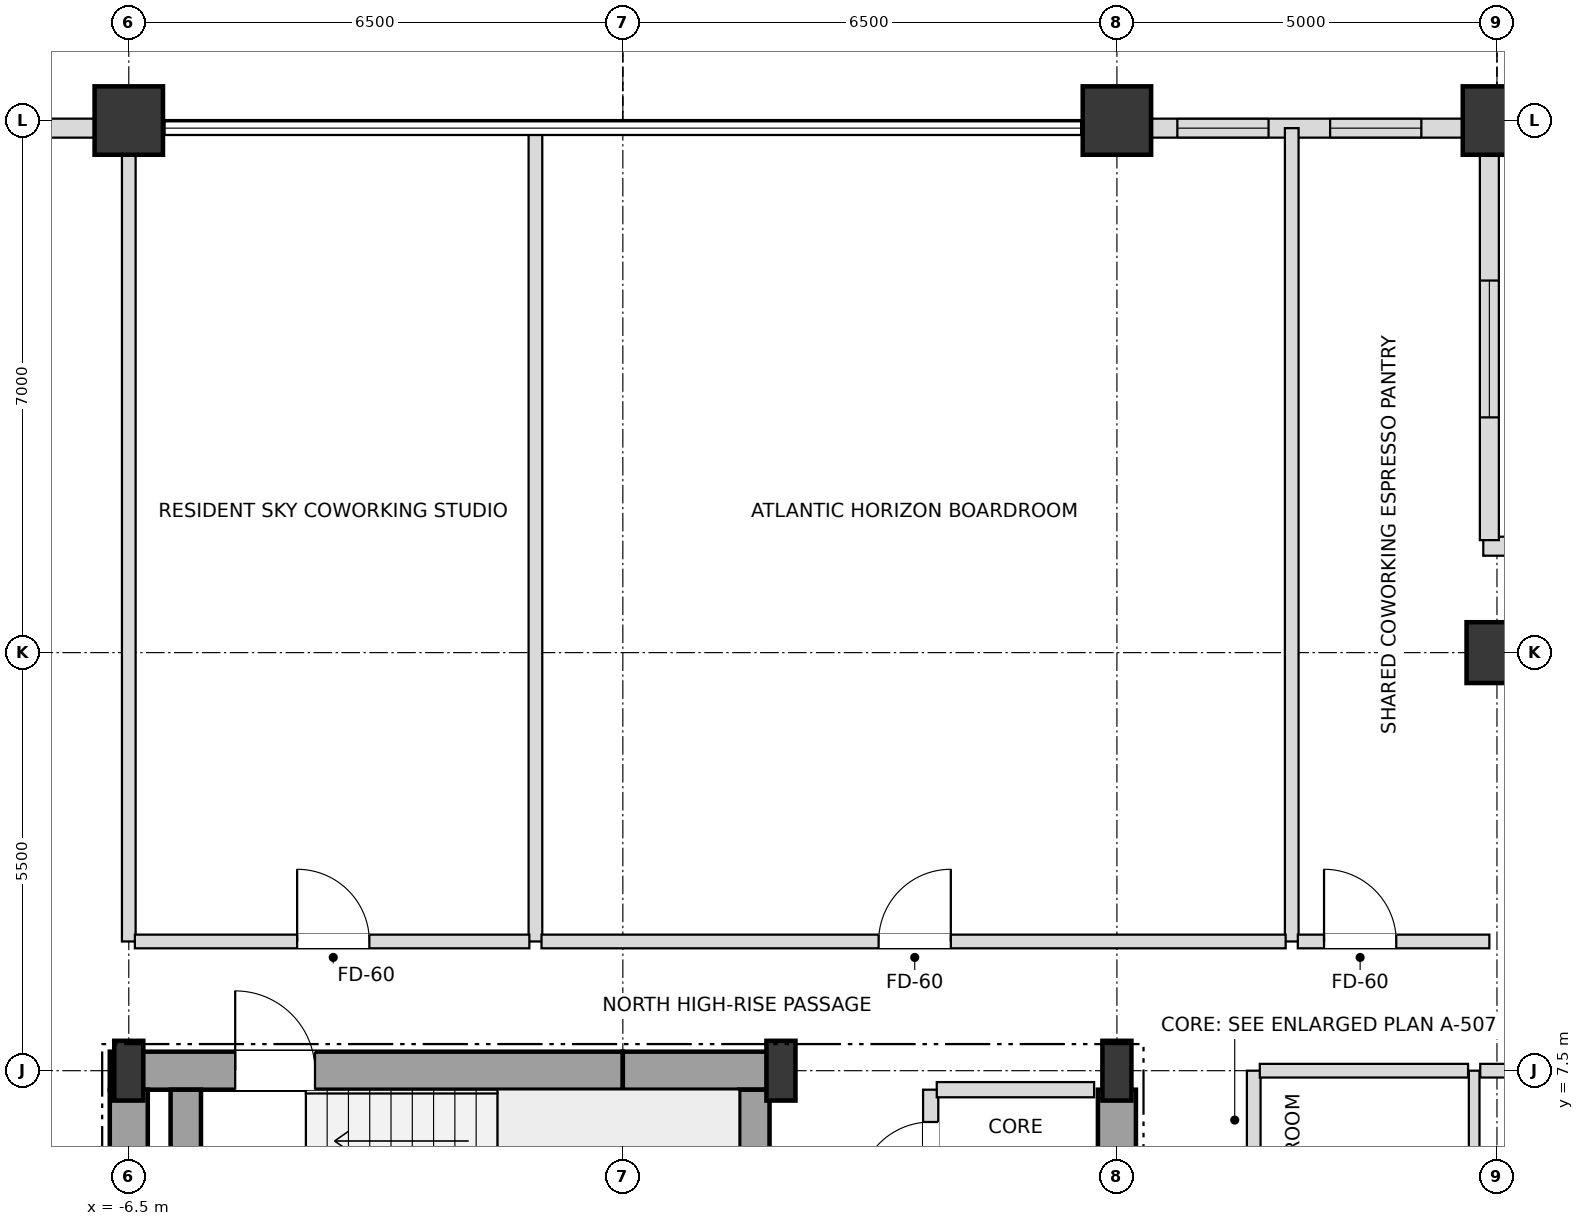
"""IFC4 building model, lengths in metres.
Left out: names, types, materials, properties, quantities, classifications, styles, units other than length and angle.
Written with IfcOpenShell. Run it as: python <this file> out.ifc"""

import sys

from ifc_helpers import new_model, si_unit, direction, frame, frame_2d, origin, origin_2d, place, context, subcontext, project, spatial, rectangle, i_section, extrude, element, fill, save


model = new_model("IFC4")
c1 = context("Model", 3, precision=1e-05, world=origin(), true_north=direction((0.0, 1.0)))
c2 = subcontext(c1, "Body", "Model", "MODEL_VIEW")
j1 = project(units=[si_unit("LENGTHUNIT", "METRE"), si_unit("PLANEANGLEUNIT", "RADIAN")], contexts=[c1])
p1 = place(None, origin())
s1 = spatial("IfcSite", under=j1, at=p1, CompositionType="ELEMENT")
p2 = place(p1, origin())
s2 = spatial("IfcBuilding", under=s1, at=p2, CompositionType="ELEMENT")
p3 = place(p2, frame((0.0, 0.0, 294.3)))
s3 = spatial("IfcBuildingStorey", under=s2, at=p3, CompositionType="ELEMENT", Elevation=294.3)
for number, where, z_axis, x_axis in (
    (1, (-6.5, 7.5, 0.0), (0.0, 0.0, 1.0), (1.0, 0.0, 0.0)),
    (2, (2.08, 7.5, 0.0), (0.0, 0.0, 1.0), (1.0, 0.0, 0.0)),
    (3, (6.5, 7.5, 0.0), (0.0, 0.0, 1.0), (1.0, 0.0, 0.0)),
):
    element("IfcColumn", number, at=place(p3, frame(where, z_axis=z_axis, x_axis=x_axis)), inside=s3, PredefinedType="COLUMN", context=c2, shape_type="SweptSolid", body=[
        extrude(i_section(OverallWidth=0.382, OverallDepth=0.786, WebThickness=0.02, FlangeThickness=0.033, at=origin_2d()), origin(), (0.0, 0.0, 1.0), 3.6),
    ])
for number, where, z_axis, x_axis in (
    (4, (11.5, 20.0, 0.0), (0.0, 0.0, 1.0), (1.0, 0.0, 0.0)),
    (5, (6.5, 20.0, 0.0), (0.0, 0.0, 1.0), (1.0, 0.0, 0.0)),
    (6, (-6.5, 20.0, 0.0), (0.0, 0.0, 1.0), (1.0, 0.0, 0.0)),
):
    element("IfcColumn", number, at=place(p3, frame(where, z_axis=z_axis, x_axis=x_axis)), inside=s3, PredefinedType="USERDEFINED", context=c2, shape_type="SweptSolid", body=[
        extrude(rectangle(XDim=0.9, YDim=0.9, at=origin_2d()), origin(), (0.0, 0.0, 1.0), 3.6),
    ])
p4 = place(p3, frame((11.5, 13.0, 0.0), z_axis=(0.0, 0.0, 1.0), x_axis=(1.0, 0.0, 0.0)))
e7 = element("IfcColumn", 7, at=p4, inside=s3, PredefinedType="COLUMN", context=c2, shape_type="SweptSolid", body=[
    extrude(rectangle(XDim=0.8, YDim=0.8, at=origin_2d()), origin(), (0.0, 0.0, 1.0), 3.6),
])
p5 = place(p3, frame((11.055, 19.9, 0.0), z_axis=(0.0, 0.0, 1.0), x_axis=(-1.0, 0.0, 0.0)))
e8 = element("IfcWall", 8, at=p5, inside=s3, PredefinedType="SOLIDWALL", context=c2, shape_type="SweptSolid", body=[
    extrude(rectangle(XDim=4.11, YDim=0.25, at=frame_2d((2.055, 0.0))), origin(), (0.0, 0.0, 1.0), 2.748),
])
p6 = place(p5, frame((0.55, 0.0, 0.72)))
e9 = element("IfcOpeningElement", 9, at=p6, cuts=e8, PredefinedType="OPENING", context=c2, shape_type="SweptSolid", body=[
    extrude(rectangle(XDim=1.2, YDim=1.68, at=frame_2d((0.6, 0.84))), frame((0.0, 0.135, 0.0), z_axis=(0.0, -1.0, 0.0), x_axis=(1.0, 0.0, 0.0)), (0.0, 0.0, 1.0), 0.27),
])
p7 = place(p5, frame((2.56, 0.0, 0.72)))
e10 = element("IfcOpeningElement", 10, at=p7, cuts=e8, PredefinedType="OPENING", context=c2, shape_type="SweptSolid", body=[
    extrude(rectangle(XDim=1.2, YDim=1.68, at=frame_2d((0.6, 0.84))), frame((0.0, 0.135, 0.0), z_axis=(0.0, -1.0, 0.0), x_axis=(1.0, 0.0, 0.0)), (0.0, 0.0, 1.0), 0.27),
])
p8 = place(p3, frame((-6.945, 19.9, 0.0), z_axis=(0.0, 0.0, 1.0), x_axis=(-1.0, 0.0, 0.0)))
e11 = element("IfcWall", 11, at=p8, inside=s3, PredefinedType="SOLIDWALL", context=c2, shape_type="SweptSolid", body=[
    extrude(rectangle(XDim=4.11, YDim=0.25, at=frame_2d((2.055, 0.0))), origin(), (0.0, 0.0, 1.0), 2.748),
])
p9 = place(p8, frame((1.155, 0.0, 0.72)))
e12 = element("IfcOpeningElement", 12, at=p9, cuts=e11, PredefinedType="OPENING", context=c2, shape_type="SweptSolid", body=[
    extrude(rectangle(XDim=1.8, YDim=1.68, at=frame_2d((0.9, 0.84))), frame((0.0, 0.135, 0.0), z_axis=(0.0, -1.0, 0.0), x_axis=(1.0, 0.0, 0.0)), (0.0, 0.0, 1.0), 0.27),
])
p10 = place(p3, frame((16.98, 14.4, 0.0), z_axis=(0.0, 0.0, 1.0), x_axis=(-1.0, 0.0, 0.0)))
e13 = element("IfcWall", 13, at=p10, inside=s3, PredefinedType="SOLIDWALL", context=c2, shape_type="SweptSolid", body=[
    extrude(rectangle(XDim=5.66, YDim=0.25, at=frame_2d((2.83, 0.0))), origin(), (0.0, 0.0, 1.0), 2.748),
])
p11 = place(p10, frame((0.595, 0.0, 0.72)))
e14 = element("IfcOpeningElement", 14, at=p11, cuts=e13, PredefinedType="OPENING", context=c2, shape_type="SweptSolid", body=[
    extrude(rectangle(XDim=1.8, YDim=1.68, at=frame_2d((0.9, 0.84))), frame((0.0, 0.135, 0.0), z_axis=(0.0, -1.0, 0.0), x_axis=(1.0, 0.0, 0.0)), (0.0, 0.0, 1.0), 0.27),
])
p12 = place(p10, frame((3.265, 0.0, 0.72)))
e15 = element("IfcOpeningElement", 15, at=p12, cuts=e13, PredefinedType="OPENING", context=c2, shape_type="SweptSolid", body=[
    extrude(rectangle(XDim=1.8, YDim=1.68, at=frame_2d((0.9, 0.84))), frame((0.0, 0.135, 0.0), z_axis=(0.0, -1.0, 0.0), x_axis=(1.0, 0.0, 0.0)), (0.0, 0.0, 1.0), 0.27),
])
p13 = place(p3, frame((11.4, 14.48, 0.0), z_axis=(0.0, 0.0, 1.0), x_axis=(0.0, 1.0, 0.0)))
e16 = element("IfcWall", 16, at=p13, inside=s3, PredefinedType="SOLIDWALL", context=c2, shape_type="SweptSolid", body=[
    extrude(rectangle(XDim=5.34, YDim=0.25, at=frame_2d((2.67, 0.0))), origin(), (0.0, 0.0, 1.0), 2.748),
])
p14 = place(p13, frame((1.615, 0.0, 0.72)))
e17 = element("IfcOpeningElement", 17, at=p14, cuts=e16, PredefinedType="OPENING", context=c2, shape_type="SweptSolid", body=[
    extrude(rectangle(XDim=1.8, YDim=1.68, at=frame_2d((0.9, 0.84))), frame((0.0, 0.135, 0.0), z_axis=(0.0, -1.0, 0.0), x_axis=(1.0, 0.0, 0.0)), (0.0, 0.0, 1.0), 0.27),
])
p15 = place(p3, frame((-6.75, 7.5, 0.0), z_axis=(0.0, 0.0, 1.0), x_axis=(1.0, 0.0, 0.0)))
e18 = element("IfcWall", 18, at=p15, inside=s3, PredefinedType="SHEAR", context=c2, shape_type="SweptSolid", body=[
    extrude(rectangle(XDim=6.75, YDim=0.5, at=frame_2d((3.375, 0.0))), origin(), (0.0, 0.0, 1.0), 3.38),
])
p16 = place(p15, frame((1.65, 0.0, 0.0)))
e19 = element("IfcOpeningElement", 19, at=p16, cuts=e18, PredefinedType="OPENING", context=c2, shape_type="SweptSolid", body=[
    extrude(rectangle(XDim=1.05, YDim=2.15, at=frame_2d((0.525, 1.075))), frame((0.0, 0.26, 0.0), z_axis=(0.0, -1.0, 0.0), x_axis=(1.0, 0.0, 0.0)), (0.0, 0.0, 1.0), 0.52),
])
p17 = place(p3, frame((0.0, 7.5, 0.0), z_axis=(0.0, 0.0, 1.0), x_axis=(1.0, 0.0, 0.0)))
e20 = element("IfcWall", 20, at=p17, inside=s3, PredefinedType="SHEAR", context=c2, shape_type="SweptSolid", body=[
    extrude(rectangle(XDim=2.08, YDim=0.5, at=frame_2d((1.04, 0.0))), origin(), (0.0, 0.0, 1.0), 3.38),
])
for number, where, z_axis, x_axis in (
    (21, (-6.5, 3.95, 0.0), (0.0, 0.0, 1.0), (0.0, 1.0, 0.0)),
    (22, (6.5, 3.95, 0.0), (0.0, 0.0, 1.0), (0.0, 1.0, 0.0)),
):
    element("IfcWall", number, at=place(p3, frame(where, z_axis=z_axis, x_axis=x_axis)), inside=s3, PredefinedType="SHEAR", context=c2, shape_type="SweptSolid", body=[
        extrude(rectangle(XDim=3.3, YDim=0.5, at=frame_2d((1.65, 0.0))), origin(), (0.0, 0.0, 1.0), 3.38),
    ])
for number, where, z_axis, x_axis in (
    (23, (1.73, 3.95, 0.0), (0.0, 0.0, 1.0), (0.0, 1.0, 0.0)),
    (24, (-5.75, 3.95, 0.0), (0.0, 0.0, 1.0), (0.0, 1.0, 0.0)),
):
    element("IfcWall", number, at=place(p3, frame(where, z_axis=z_axis, x_axis=x_axis)), inside=s3, PredefinedType="SHEAR", context=c2, shape_type="SweptSolid", body=[
        extrude(rectangle(XDim=3.3, YDim=0.4, at=frame_2d((1.65, 0.0))), origin(), (0.0, 0.0, 1.0), 3.38),
    ])
p18 = place(p3, frame((-6.5, 9.2, 0.0), z_axis=(0.0, 0.0, 1.0), x_axis=(0.0, 1.0, 0.0)))
e25 = element("IfcWall", 25, at=p18, inside=s3, PredefinedType="PARTITIONING", context=c2, shape_type="SweptSolid", body=[
    extrude(rectangle(XDim=10.7, YDim=0.18, at=frame_2d((5.35, 0.0))), origin(), (0.0, 0.0, 1.0), 2.826),
])
p19 = place(p3, frame((-1.15, 9.2, 0.0), z_axis=(0.0, 0.0, 1.0), x_axis=(0.0, 1.0, 0.0)))
e26 = element("IfcWall", 26, at=p19, inside=s3, PredefinedType="PARTITIONING", context=c2, shape_type="SweptSolid", body=[
    extrude(rectangle(XDim=10.7, YDim=0.18, at=frame_2d((5.35, 0.0))), origin(), (0.0, 0.0, 1.0), 3.018),
])
p20 = place(p3, frame((4.05, 5.55, 0.0), z_axis=(0.0, 0.0, 1.0), x_axis=(0.0, 1.0, 0.0)))
e27 = element("IfcWall", 27, at=p20, inside=s3, PredefinedType="SOLIDWALL", context=c2, shape_type="SweptSolid", body=[
    extrude(rectangle(XDim=1.7, YDim=0.2, at=frame_2d((0.85, 0.0))), origin(), (0.0, 0.0, 1.0), 3.38),
])
p21 = place(p20, frame((0.325, 0.0, 0.0)))
e28 = element("IfcOpeningElement", 28, at=p21, cuts=e27, PredefinedType="OPENING", context=c2, shape_type="SweptSolid", body=[
    extrude(rectangle(XDim=0.95, YDim=2.15, at=frame_2d((0.475, 1.075))), frame((0.0, 0.11, 0.0), z_axis=(0.0, -1.0, 0.0), x_axis=(1.0, 0.0, 0.0)), (0.0, 0.0, 1.0), 0.22),
])
p22 = place(p3, frame((8.3, -7.5, 0.0), z_axis=(0.0, 0.0, 1.0), x_axis=(0.0, 1.0, 0.0)))
e29 = element("IfcWall", 29, at=p22, inside=s3, PredefinedType="PARTITIONING", context=c2, shape_type="SweptSolid", body=[
    extrude(rectangle(XDim=15.0, YDim=0.18, at=frame_2d((7.5, 0.0))), origin(), (0.0, 0.0, 1.0), 3.38),
])
p23 = place(p22, frame((2.355, 0.0, 0.0)))
e30 = element("IfcOpeningElement", 30, at=p23, cuts=e29, PredefinedType="OPENING", context=c2, shape_type="SweptSolid", body=[
    extrude(rectangle(XDim=0.95, YDim=2.15, at=frame_2d((0.475, 1.075))), frame((0.0, 0.1, 0.0), z_axis=(0.0, -1.0, 0.0), x_axis=(1.0, 0.0, 0.0)), (0.0, 0.0, 1.0), 0.2),
])
p24 = place(p3, frame((8.8, 9.2, 0.0), z_axis=(0.0, 0.0, 1.0), x_axis=(0.0, 1.0, 0.0)))
e31 = element("IfcWall", 31, at=p24, inside=s3, PredefinedType="PARTITIONING", context=c2, shape_type="SweptSolid", body=[
    extrude(rectangle(XDim=10.7, YDim=0.18, at=frame_2d((5.35, 0.0))), origin(), (0.0, 0.0, 1.0), 2.826),
])
p25 = place(p3, frame((11.2, -7.5, 0.0), z_axis=(0.0, 0.0, 1.0), x_axis=(0.0, 1.0, 0.0)))
e32 = element("IfcWall", 32, at=p25, inside=s3, PredefinedType="PARTITIONING", context=c2, shape_type="SweptSolid", body=[
    extrude(rectangle(XDim=15.0, YDim=0.14, at=frame_2d((7.5, 0.0))), origin(), (0.0, 0.0, 1.0), 3.38),
])
p26 = place(p25, frame((3.475, 0.0, 0.0)))
e33 = element("IfcOpeningElement", 33, at=p26, cuts=e32, PredefinedType="OPENING", context=c2, shape_type="SweptSolid", body=[
    extrude(rectangle(XDim=0.95, YDim=2.1, at=frame_2d((0.475, 1.05))), frame((0.0, 0.08, 0.0), z_axis=(0.0, -1.0, 0.0), x_axis=(1.0, 0.0, 0.0)), (0.0, 0.0, 1.0), 0.16),
])
p27 = place(p3, frame((4.13, 7.25, 0.0), z_axis=(0.0, 0.0, 1.0), x_axis=(1.0, 0.0, 0.0)))
e34 = element("IfcWall", 34, at=p27, inside=s3, PredefinedType="SOLIDWALL", context=c2, shape_type="SweptSolid", body=[
    extrude(rectangle(XDim=2.07, YDim=0.2, at=frame_2d((1.035, 0.0))), origin(), (0.0, 0.0, 1.0), 3.38),
])
p28 = place(p3, frame((8.38, 7.5, 0.0), z_axis=(0.0, 0.0, 1.0), x_axis=(1.0, 0.0, 0.0)))
e35 = element("IfcWall", 35, at=p28, inside=s3, PredefinedType="PARTITIONING", context=c2, shape_type="SweptSolid", body=[
    extrude(rectangle(XDim=2.74, YDim=0.18, at=frame_2d((1.37, 0.0))), origin(), (0.0, 0.0, 1.0), 2.826),
])
p29 = place(p3, frame((11.28, 7.5, 0.0), z_axis=(0.0, 0.0, 1.0), x_axis=(1.0, 0.0, 0.0)))
e36 = element("IfcWall", 36, at=p29, inside=s3, PredefinedType="PARTITIONING", context=c2, shape_type="SweptSolid", body=[
    extrude(rectangle(XDim=5.62, YDim=0.18, at=frame_2d((2.81, 0.0))), origin(), (0.0, 0.0, 1.0), 2.826),
])
p30 = place(p3, frame((-6.42, 9.2, 0.0), z_axis=(0.0, 0.0, 1.0), x_axis=(1.0, 0.0, 0.0)))
e37 = element("IfcWall", 37, at=p30, inside=s3, PredefinedType="PARTITIONING", context=c2, shape_type="SweptSolid", body=[
    extrude(rectangle(XDim=5.19, YDim=0.18, at=frame_2d((2.595, 0.0))), origin(), (0.0, 0.0, 1.0), 3.38),
])
p31 = place(p30, frame((2.135, 0.0, 0.0)))
e38 = element("IfcOpeningElement", 38, at=p31, cuts=e37, PredefinedType="OPENING", context=c2, shape_type="SweptSolid", body=[
    extrude(rectangle(XDim=0.95, YDim=2.15, at=frame_2d((0.475, 1.075))), frame((0.0, 0.1, 0.0), z_axis=(0.0, -1.0, 0.0), x_axis=(1.0, 0.0, 0.0)), (0.0, 0.0, 1.0), 0.2),
])
p32 = place(p3, frame((-1.07, 9.2, 0.0), z_axis=(0.0, 0.0, 1.0), x_axis=(1.0, 0.0, 0.0)))
e39 = element("IfcWall", 39, at=p32, inside=s3, PredefinedType="PARTITIONING", context=c2, shape_type="SweptSolid", body=[
    extrude(rectangle(XDim=9.79, YDim=0.18, at=frame_2d((4.895, 0.0))), origin(), (0.0, 0.0, 1.0), 2.826),
])
p33 = place(p32, frame((4.435, 0.0, 0.0)))
e40 = element("IfcOpeningElement", 40, at=p33, cuts=e39, PredefinedType="OPENING", context=c2, shape_type="SweptSolid", body=[
    extrude(rectangle(XDim=0.95, YDim=2.15, at=frame_2d((0.475, 1.075))), frame((0.0, 0.1, 0.0), z_axis=(0.0, -1.0, 0.0), x_axis=(1.0, 0.0, 0.0)), (0.0, 0.0, 1.0), 0.2),
])
p34 = place(p3, frame((8.88, 9.2, 0.0), z_axis=(0.0, 0.0, 1.0), x_axis=(1.0, 0.0, 0.0)))
e41 = element("IfcWall", 41, at=p34, inside=s3, PredefinedType="PARTITIONING", context=c2, shape_type="SweptSolid", body=[
    extrude(rectangle(XDim=2.52, YDim=0.18, at=frame_2d((1.26, 0.0))), origin(), (0.0, 0.0, 1.0), 3.38),
])
p35 = place(p34, frame((0.345, 0.0, 0.0)))
e42 = element("IfcOpeningElement", 42, at=p35, cuts=e41, PredefinedType="OPENING", context=c2, shape_type="SweptSolid", body=[
    extrude(rectangle(XDim=0.95, YDim=2.15, at=frame_2d((0.475, 1.075))), frame((0.0, 0.1, 0.0), z_axis=(0.0, -1.0, 0.0), x_axis=(1.0, 0.0, 0.0)), (0.0, 0.0, 1.0), 0.2),
])
p36 = place(p6, origin())
e43 = element("IfcWindow", 43, at=p36, inside=s3, PartitioningType="SINGLE_PANEL", PredefinedType="WINDOW", context=c2, shape_type="SweptSolid", body=[
    extrude(rectangle(XDim=1.2, YDim=1.68, at=frame_2d((0.6, 0.84))), frame((0.0, 0.03, 0.0), z_axis=(0.0, -1.0, 0.0), x_axis=(1.0, 0.0, 0.0)), (0.0, 0.0, 1.0), 0.06),
])
fill(e9, e43)
p37 = place(p7, origin())
e44 = element("IfcWindow", 44, at=p37, inside=s3, PartitioningType="SINGLE_PANEL", PredefinedType="WINDOW", context=c2, shape_type="SweptSolid", body=[
    extrude(rectangle(XDim=1.2, YDim=1.68, at=frame_2d((0.6, 0.84))), frame((0.0, 0.03, 0.0), z_axis=(0.0, -1.0, 0.0), x_axis=(1.0, 0.0, 0.0)), (0.0, 0.0, 1.0), 0.06),
])
fill(e10, e44)
p38 = place(p14, origin())
e45 = element("IfcWindow", 45, at=p38, inside=s3, PartitioningType="SINGLE_PANEL", PredefinedType="WINDOW", context=c2, shape_type="SweptSolid", body=[
    extrude(rectangle(XDim=1.8, YDim=1.68, at=frame_2d((0.9, 0.84))), frame((0.0, 0.03, 0.0), z_axis=(0.0, -1.0, 0.0), x_axis=(1.0, 0.0, 0.0)), (0.0, 0.0, 1.0), 0.06),
])
fill(e17, e45)
p39 = place(p16, origin())
e46 = element("IfcDoor", 46, at=p39, inside=s3, OperationType="SINGLE_SWING_LEFT", PredefinedType="DOOR", context=c2, shape_type="SweptSolid", body=[
    extrude(rectangle(XDim=1.05, YDim=2.15, at=frame_2d((0.525, 1.075))), frame((0.0, 0.025, 0.0), z_axis=(0.0, -1.0, 0.0), x_axis=(1.0, 0.0, 0.0)), (0.0, 0.0, 1.0), 0.05),
])
fill(e19, e46)
p40 = place(p21, origin())
e47 = element("IfcDoor", 47, at=p40, inside=s3, OperationType="SINGLE_SWING_LEFT", PredefinedType="DOOR", context=c2, shape_type="SweptSolid", body=[
    extrude(rectangle(XDim=0.95, YDim=2.15, at=frame_2d((0.475, 1.075))), frame((0.0, 0.025, 0.0), z_axis=(0.0, -1.0, 0.0), x_axis=(1.0, 0.0, 0.0)), (0.0, 0.0, 1.0), 0.05),
])
fill(e28, e47)
p41 = place(p31, origin())
e48 = element("IfcDoor", 48, at=p41, inside=s3, OperationType="SINGLE_SWING_LEFT", PredefinedType="DOOR", context=c2, shape_type="SweptSolid", body=[
    extrude(rectangle(XDim=0.95, YDim=2.15, at=frame_2d((0.475, 1.075))), frame((0.0, 0.025, 0.0), z_axis=(0.0, -1.0, 0.0), x_axis=(1.0, 0.0, 0.0)), (0.0, 0.0, 1.0), 0.05),
])
fill(e38, e48)
p42 = place(p33, origin())
e49 = element("IfcDoor", 49, at=p42, inside=s3, OperationType="SINGLE_SWING_RIGHT", PredefinedType="DOOR", context=c2, shape_type="SweptSolid", body=[
    extrude(rectangle(XDim=0.95, YDim=2.15, at=frame_2d((0.475, 1.075))), frame((0.0, 0.025, 0.0), z_axis=(0.0, -1.0, 0.0), x_axis=(1.0, 0.0, 0.0)), (0.0, 0.0, 1.0), 0.05),
])
fill(e40, e49)
p43 = place(p35, origin())
e50 = element("IfcDoor", 50, at=p43, inside=s3, OperationType="SINGLE_SWING_LEFT", PredefinedType="DOOR", context=c2, shape_type="SweptSolid", body=[
    extrude(rectangle(XDim=0.95, YDim=2.15, at=frame_2d((0.475, 1.075))), frame((0.0, 0.025, 0.0), z_axis=(0.0, -1.0, 0.0), x_axis=(1.0, 0.0, 0.0)), (0.0, 0.0, 1.0), 0.05),
])
fill(e42, e50)
save(model, sys.argv[1])
